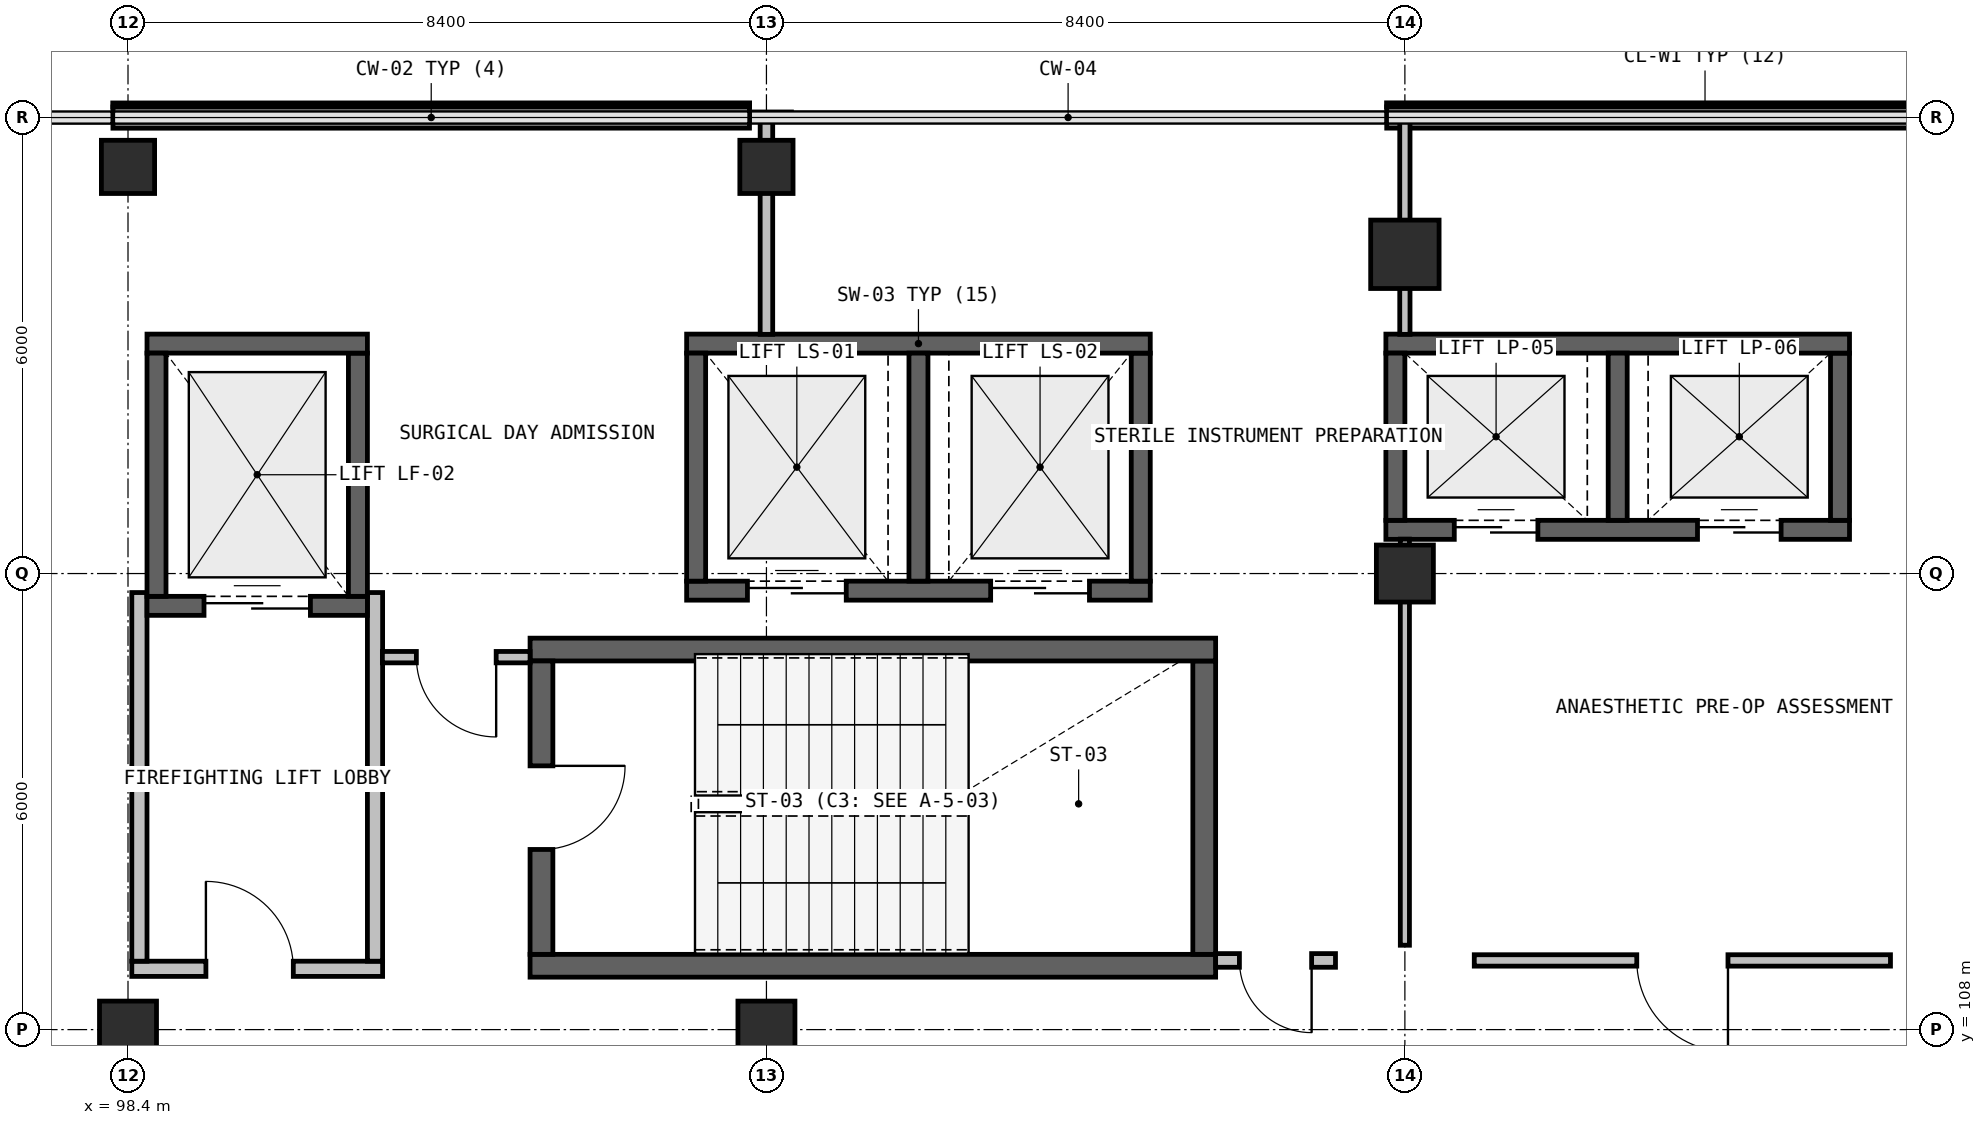
"""IFC4 building model, lengths in metres.
Left out: names, types, materials, properties, quantities, classifications, styles, units other than length and angle.
Written with IfcOpenShell. Run it as: python <this file> out.ifc"""

import sys

from ifc_helpers import new_model, si_unit, direction, frame, frame_2d, origin, origin_2d, place, context, subcontext, project, spatial, rectangle, extrude, element, fill, save


model = new_model("IFC4")
c1 = context("Model", 3, precision=1e-05, world=origin(), true_north=direction((0.0, 1.0)))
c2 = subcontext(c1, "Body", "Model", "MODEL_VIEW")
j1 = project(units=[si_unit("LENGTHUNIT", "METRE"), si_unit("PLANEANGLEUNIT", "RADIAN")], contexts=[c1])
p1 = place(None, origin())
s1 = spatial("IfcSite", under=j1, at=p1, CompositionType="ELEMENT")
p2 = place(p1, origin())
s2 = spatial("IfcBuilding", under=s1, at=p2, CompositionType="ELEMENT")
p3 = place(p2, frame((0.0, 0.0, 10.2)))
s3 = spatial("IfcBuildingStorey", under=s2, at=p3, CompositionType="ELEMENT", Elevation=10.2)
p4 = place(p3, frame((115.2, 118.2, 0.0), z_axis=(0.0, 0.0, 1.0), x_axis=(1.0, 0.0, 0.0)))
e1 = element("IfcColumn", 1, at=p4, inside=s3, PredefinedType="COLUMN", context=c2, shape_type="SweptSolid", body=[
    extrude(rectangle(XDim=0.9, YDim=0.9, at=origin_2d()), origin(), (0.0, 0.0, 1.0), 4.8),
])
p5 = place(p3, frame((98.4, 108.0, 0.0), z_axis=(0.0, 0.0, 1.0), x_axis=(1.0, 0.0, 0.0)))
e2 = element("IfcColumn", 2, at=p5, inside=s3, PredefinedType="COLUMN", context=c2, shape_type="SweptSolid", body=[
    extrude(rectangle(XDim=0.75, YDim=0.75, at=origin_2d()), origin(), (0.0, 0.0, 1.0), 4.8),
])
p6 = place(p3, frame((98.4, 119.35, 0.0), z_axis=(0.0, 0.0, 1.0), x_axis=(1.0, 0.0, 0.0)))
e3 = element("IfcColumn", 3, at=p6, inside=s3, PredefinedType="COLUMN", context=c2, shape_type="SweptSolid", body=[
    extrude(rectangle(XDim=0.7, YDim=0.7, at=origin_2d()), origin(), (0.0, 0.0, 1.0), 4.8),
])
p7 = place(p3, frame((106.8, 108.0, 0.0), z_axis=(0.0, 0.0, 1.0), x_axis=(1.0, 0.0, 0.0)))
e4 = element("IfcColumn", 4, at=p7, inside=s3, PredefinedType="COLUMN", context=c2, shape_type="SweptSolid", body=[
    extrude(rectangle(XDim=0.75, YDim=0.75, at=origin_2d()), origin(), (0.0, 0.0, 1.0), 4.8),
])
p8 = place(p3, frame((106.8, 119.35, 0.0), z_axis=(0.0, 0.0, 1.0), x_axis=(1.0, 0.0, 0.0)))
e5 = element("IfcColumn", 5, at=p8, inside=s3, PredefinedType="COLUMN", context=c2, shape_type="SweptSolid", body=[
    extrude(rectangle(XDim=0.7, YDim=0.7, at=origin_2d()), origin(), (0.0, 0.0, 1.0), 4.8),
])
p9 = place(p3, frame((115.2, 114.0, 0.0), z_axis=(0.0, 0.0, 1.0), x_axis=(1.0, 0.0, 0.0)))
e6 = element("IfcColumn", 6, at=p9, inside=s3, PredefinedType="COLUMN", context=c2, shape_type="SweptSolid", body=[
    extrude(rectangle(XDim=0.75, YDim=0.75, at=origin_2d()), origin(), (0.0, 0.0, 1.0), 4.8),
])
p10 = place(p3, frame((98.202, 119.999, 0.0), z_axis=(0.0, 0.0, 1.0), x_axis=(0.999999993202, 0.000116604477, 0.0)))
e7 = element("IfcWall", 7, at=p10, inside=s3, PredefinedType="SOLIDWALL", context=c2, shape_type="SweptSolid", body=[
    extrude(rectangle(XDim=8.375, YDim=0.28, at=frame_2d((4.188, 0.0))), origin(), (0.0, 0.0, 1.0), 0.94),
])
p11 = place(p3, frame((114.961, 120.0, 0.0), z_axis=(0.0, 0.0, 1.0), x_axis=(1.0, 0.0, 0.0)))
e8 = element("IfcWall", 8, at=p11, inside=s3, PredefinedType="SOLIDWALL", context=c2, shape_type="SweptSolid", body=[
    extrude(rectangle(XDim=8.376, YDim=0.28, at=frame_2d((4.188, 0.0))), origin(), (0.0, 0.0, 1.0), 0.94),
])
p12 = place(p3, frame((98.45, 108.8, 0.0), z_axis=(0.0, 0.0, 1.0), x_axis=(1.0, 0.0, 0.0)))
e9 = element("IfcWall", 9, at=p12, inside=s3, PredefinedType="SOLIDWALL", context=c2, shape_type="SweptSolid", body=[
    extrude(rectangle(XDim=3.3, YDim=0.2, at=frame_2d((1.65, 0.0))), origin(), (0.0, 0.0, 1.0), 4.46),
])
p13 = place(p12, frame((0.975, 0.0, 0.0)))
e10 = element("IfcOpeningElement", 10, at=p13, cuts=e9, PredefinedType="OPENING", context=c2, shape_type="SweptSolid", body=[
    extrude(rectangle(XDim=1.15, YDim=2.15, at=frame_2d((0.575, 1.075))), frame((0.0, 0.11, 0.0), z_axis=(0.0, -1.0, 0.0), x_axis=(1.0, 0.0, 0.0)), (0.0, 0.0, 1.0), 0.22),
])
p14 = place(p3, frame((101.65, 108.9, 0.0), z_axis=(0.0, 0.0, 1.0), x_axis=(0.0, 1.0, 0.0)))
e11 = element("IfcWall", 11, at=p14, inside=s3, PredefinedType="SOLIDWALL", context=c2, shape_type="SweptSolid", body=[
    extrude(rectangle(XDim=4.85, YDim=0.2, at=frame_2d((2.425, 0.0))), origin(), (0.0, 0.0, 1.0), 4.46),
])
p15 = place(p3, frame((98.55, 113.75, 0.0), z_axis=(0.0, 0.0, 1.0), x_axis=(0.0, -1.0, 0.0)))
e12 = element("IfcWall", 12, at=p15, inside=s3, PredefinedType="SOLIDWALL", context=c2, shape_type="SweptSolid", body=[
    extrude(rectangle(XDim=4.85, YDim=0.2, at=frame_2d((2.425, 0.0))), origin(), (0.0, 0.0, 1.0), 3.81),
])
p16 = place(p3, frame((103.69, 108.84, 0.0), z_axis=(0.0, 0.0, 1.0), x_axis=(1.0, 0.0, 0.0)))
e13 = element("IfcWall", 13, at=p16, inside=s3, PredefinedType="SHEAR", context=c2, shape_type="SweptSolid", body=[
    extrude(rectangle(XDim=9.02, YDim=0.3, at=frame_2d((4.51, 0.0))), origin(), (0.0, 0.0, 1.0), 4.46),
])
p17 = place(p3, frame((112.56, 108.99, 0.0), z_axis=(0.0, 0.0, 1.0), x_axis=(0.0, 1.0, 0.0)))
e14 = element("IfcWall", 14, at=p17, inside=s3, PredefinedType="SHEAR", context=c2, shape_type="SweptSolid", body=[
    extrude(rectangle(XDim=3.86, YDim=0.3, at=frame_2d((1.93, 0.0))), origin(), (0.0, 0.0, 1.0), 4.46),
])
p18 = place(p3, frame((112.71, 113.0, 0.0), z_axis=(0.0, 0.0, 1.0), x_axis=(-1.0, 0.0, 0.0)))
e15 = element("IfcWall", 15, at=p18, inside=s3, PredefinedType="SHEAR", context=c2, shape_type="SweptSolid", body=[
    extrude(rectangle(XDim=9.02, YDim=0.3, at=frame_2d((4.51, 0.0))), origin(), (0.0, 0.0, 1.0), 4.46),
])
p19 = place(p3, frame((103.84, 112.85, 0.0), z_axis=(0.0, 0.0, 1.0), x_axis=(0.0, -1.0, 0.0)))
e16 = element("IfcWall", 16, at=p19, inside=s3, PredefinedType="SHEAR", context=c2, shape_type="SweptSolid", body=[
    extrude(rectangle(XDim=3.86, YDim=0.3, at=frame_2d((1.93, 0.0))), origin(), (0.0, 0.0, 1.0), 4.46),
])
p20 = place(p19, frame((1.38, 0.0, 0.0)))
e17 = element("IfcOpeningElement", 17, at=p20, cuts=e16, PredefinedType="OPENING", context=c2, shape_type="SweptSolid", body=[
    extrude(rectangle(XDim=1.1, YDim=2.15, at=frame_2d((0.55, 1.075))), frame((0.0, 0.16, 0.0), z_axis=(0.0, -1.0, 0.0), x_axis=(1.0, 0.0, 0.0)), (0.0, 0.0, 1.0), 0.32),
])
p21 = place(p3, frame((98.65, 113.575, 0.0), z_axis=(0.0, 0.0, 1.0), x_axis=(1.0, 0.0, 0.0)))
e18 = element("IfcWall", 18, at=p21, inside=s3, PredefinedType="SHEAR", context=c2, shape_type="SweptSolid", body=[
    extrude(rectangle(XDim=2.9, YDim=0.25, at=frame_2d((1.45, 0.0))), origin(), (0.0, 0.0, 1.0), 4.46),
])
p22 = place(p21, frame((0.75, 0.0, 0.0)))
e19 = element("IfcOpeningElement", 19, at=p22, cuts=e18, PredefinedType="OPENING", context=c2, shape_type="SweptSolid", body=[
    extrude(rectangle(XDim=1.4, YDim=2.15, at=frame_2d((0.7, 1.075))), frame((0.0, 0.135, 0.0), z_axis=(0.0, -1.0, 0.0), x_axis=(1.0, 0.0, 0.0)), (0.0, 0.0, 1.0), 0.27),
])
p23 = place(p3, frame((101.425, 113.7, 0.0), z_axis=(0.0, 0.0, 1.0), x_axis=(0.0, 1.0, 0.0)))
e20 = element("IfcWall", 20, at=p23, inside=s3, PredefinedType="SHEAR", context=c2, shape_type="SweptSolid", body=[
    extrude(rectangle(XDim=3.2, YDim=0.25, at=frame_2d((1.6, 0.0))), origin(), (0.0, 0.0, 1.0), 4.46),
])
p24 = place(p3, frame((101.55, 117.025, 0.0), z_axis=(0.0, 0.0, 1.0), x_axis=(-1.0, 0.0, 0.0)))
e21 = element("IfcWall", 21, at=p24, inside=s3, PredefinedType="SHEAR", context=c2, shape_type="SweptSolid", body=[
    extrude(rectangle(XDim=2.9, YDim=0.25, at=frame_2d((1.45, 0.0))), origin(), (0.0, 0.0, 1.0), 4.46),
])
p25 = place(p3, frame((98.775, 116.9, 0.0), z_axis=(0.0, 0.0, 1.0), x_axis=(0.0, -1.0, 0.0)))
e22 = element("IfcWall", 22, at=p25, inside=s3, PredefinedType="SHEAR", context=c2, shape_type="SweptSolid", body=[
    extrude(rectangle(XDim=3.2, YDim=0.25, at=frame_2d((1.6, 0.0))), origin(), (0.0, 0.0, 1.0), 4.46),
])
p26 = place(p3, frame((105.75, 113.775, 0.0), z_axis=(0.0, 0.0, 1.0), x_axis=(1.0, 0.0, 0.0)))
e23 = element("IfcWall", 23, at=p26, inside=s3, PredefinedType="SHEAR", context=c2, shape_type="SweptSolid", body=[
    extrude(rectangle(XDim=6.1, YDim=0.25, at=frame_2d((3.05, 0.0))), origin(), (0.0, 0.0, 1.0), 4.46),
])
p27 = place(p26, frame((0.8, 0.0, 0.0)))
e24 = element("IfcOpeningElement", 24, at=p27, cuts=e23, PredefinedType="OPENING", context=c2, shape_type="SweptSolid", body=[
    extrude(rectangle(XDim=1.3, YDim=2.15, at=frame_2d((0.65, 1.075))), frame((0.0, 0.135, 0.0), z_axis=(0.0, -1.0, 0.0), x_axis=(1.0, 0.0, 0.0)), (0.0, 0.0, 1.0), 0.27),
])
p28 = place(p26, frame((4.0, 0.0, 0.0)))
e25 = element("IfcOpeningElement", 25, at=p28, cuts=e23, PredefinedType="OPENING", context=c2, shape_type="SweptSolid", body=[
    extrude(rectangle(XDim=1.3, YDim=2.15, at=frame_2d((0.65, 1.075))), frame((0.0, 0.135, 0.0), z_axis=(0.0, -1.0, 0.0), x_axis=(1.0, 0.0, 0.0)), (0.0, 0.0, 1.0), 0.27),
])
p29 = place(p3, frame((111.725, 113.9, 0.0), z_axis=(0.0, 0.0, 1.0), x_axis=(0.0, 1.0, 0.0)))
e26 = element("IfcWall", 26, at=p29, inside=s3, PredefinedType="SHEAR", context=c2, shape_type="SweptSolid", body=[
    extrude(rectangle(XDim=3.0, YDim=0.25, at=frame_2d((1.5, 0.0))), origin(), (0.0, 0.0, 1.0), 4.46),
])
p30 = place(p3, frame((111.85, 117.025, 0.0), z_axis=(0.0, 0.0, 1.0), x_axis=(-1.0, 0.0, 0.0)))
e27 = element("IfcWall", 27, at=p30, inside=s3, PredefinedType="SHEAR", context=c2, shape_type="SweptSolid", body=[
    extrude(rectangle(XDim=6.1, YDim=0.25, at=frame_2d((3.05, 0.0))), origin(), (0.0, 0.0, 1.0), 4.46),
])
for number, where, z_axis, x_axis in (
    (28, (105.875, 116.9, 0.0), (0.0, 0.0, 1.0), (0.0, -1.0, 0.0)),
    (29, (108.8, 113.9, 0.0), (0.0, 0.0, 1.0), (0.0, 1.0, 0.0)),
):
    element("IfcWall", number, at=place(p3, frame(where, z_axis=z_axis, x_axis=x_axis)), inside=s3, PredefinedType="SHEAR", context=c2, shape_type="SweptSolid", body=[
        extrude(rectangle(XDim=3.0, YDim=0.25, at=frame_2d((1.5, 0.0))), origin(), (0.0, 0.0, 1.0), 4.46),
    ])
p31 = place(p3, frame((114.95, 114.575, 0.0), z_axis=(0.0, 0.0, 1.0), x_axis=(1.0, 0.0, 0.0)))
e30 = element("IfcWall", 30, at=p31, inside=s3, PredefinedType="SHEAR", context=c2, shape_type="SweptSolid", body=[
    extrude(rectangle(XDim=6.1, YDim=0.25, at=frame_2d((3.05, 0.0))), origin(), (0.0, 0.0, 1.0), 4.46),
])
p32 = place(p31, frame((0.9, 0.0, 0.0)))
e31 = element("IfcOpeningElement", 31, at=p32, cuts=e30, PredefinedType="OPENING", context=c2, shape_type="SweptSolid", body=[
    extrude(rectangle(XDim=1.1, YDim=2.15, at=frame_2d((0.55, 1.075))), frame((0.0, 0.135, 0.0), z_axis=(0.0, -1.0, 0.0), x_axis=(1.0, 0.0, 0.0)), (0.0, 0.0, 1.0), 0.27),
])
p33 = place(p31, frame((4.1, 0.0, 0.0)))
e32 = element("IfcOpeningElement", 32, at=p33, cuts=e30, PredefinedType="OPENING", context=c2, shape_type="SweptSolid", body=[
    extrude(rectangle(XDim=1.1, YDim=2.15, at=frame_2d((0.55, 1.075))), frame((0.0, 0.135, 0.0), z_axis=(0.0, -1.0, 0.0), x_axis=(1.0, 0.0, 0.0)), (0.0, 0.0, 1.0), 0.27),
])
p34 = place(p3, frame((120.925, 114.7, 0.0), z_axis=(0.0, 0.0, 1.0), x_axis=(0.0, 1.0, 0.0)))
e33 = element("IfcWall", 33, at=p34, inside=s3, PredefinedType="SHEAR", context=c2, shape_type="SweptSolid", body=[
    extrude(rectangle(XDim=2.2, YDim=0.25, at=frame_2d((1.1, 0.0))), origin(), (0.0, 0.0, 1.0), 4.46),
])
p35 = place(p3, frame((121.05, 117.025, 0.0), z_axis=(0.0, 0.0, 1.0), x_axis=(-1.0, 0.0, 0.0)))
e34 = element("IfcWall", 34, at=p35, inside=s3, PredefinedType="SHEAR", context=c2, shape_type="SweptSolid", body=[
    extrude(rectangle(XDim=6.1, YDim=0.25, at=frame_2d((3.05, 0.0))), origin(), (0.0, 0.0, 1.0), 4.46),
])
for number, where, z_axis, x_axis in (
    (35, (115.075, 116.9, 0.0), (0.0, 0.0, 1.0), (0.0, -1.0, 0.0)),
    (36, (118.0, 114.7, 0.0), (0.0, 0.0, 1.0), (0.0, 1.0, 0.0)),
):
    element("IfcWall", number, at=place(p3, frame(where, z_axis=z_axis, x_axis=x_axis)), inside=s3, PredefinedType="SHEAR", context=c2, shape_type="SweptSolid", body=[
        extrude(rectangle(XDim=2.2, YDim=0.25, at=frame_2d((1.1, 0.0))), origin(), (0.0, 0.0, 1.0), 4.46),
    ])
p36 = place(p3, frame((106.8, 119.989, 0.0), z_axis=(0.0, 0.0, 1.0), x_axis=(0.0, -1.0, 0.0)))
e37 = element("IfcWall", 37, at=p36, inside=s3, PredefinedType="PARTITIONING", context=c2, shape_type="SweptSolid", body=[
    extrude(rectangle(XDim=2.842, YDim=0.165, at=frame_2d((1.421, 0.0))), origin(), (0.0, 0.0, 1.0), 4.46),
])
p37 = place(p3, frame((103.69, 112.9, 0.0), z_axis=(0.0, 0.0, 1.0), x_axis=(-1.0, 0.0, 0.0)))
e38 = element("IfcWall", 38, at=p37, inside=s3, PredefinedType="PARTITIONING", context=c2, shape_type="SweptSolid", body=[
    extrude(rectangle(XDim=1.943, YDim=0.15, at=frame_2d((0.971, 0.0))), origin(), (0.0, 0.0, 1.0), 4.46),
])
p38 = place(p37, frame((0.446, 0.0, 0.0)))
e39 = element("IfcOpeningElement", 39, at=p38, cuts=e38, PredefinedType="OPENING", context=c2, shape_type="SweptSolid", body=[
    extrude(rectangle(XDim=1.05, YDim=2.15, at=frame_2d((0.525, 1.075))), frame((0.0, 0.085, 0.0), z_axis=(0.0, -1.0, 0.0), x_axis=(1.0, 0.0, 0.0)), (0.0, 0.0, 1.0), 0.17),
])
p39 = place(p3, frame((115.2, 119.958, 0.0), z_axis=(0.0, 0.0, 1.0), x_axis=(0.0, -1.0, 0.0)))
e40 = element("IfcWall", 40, at=p39, inside=s3, PredefinedType="PARTITIONING", context=c2, shape_type="SweptSolid", body=[
    extrude(rectangle(XDim=2.811, YDim=0.135, at=frame_2d((1.406, 0.0))), origin(), (0.0, 0.0, 1.0), 4.46),
])
p40 = place(p3, frame((115.2, 114.453, 0.0), z_axis=(0.0, 0.0, 1.0), x_axis=(0.0, -1.0, 0.0)))
e41 = element("IfcWall", 41, at=p40, inside=s3, PredefinedType="PARTITIONING", context=c2, shape_type="SweptSolid", body=[
    extrude(rectangle(XDim=5.343, YDim=0.12, at=frame_2d((2.671, 0.0))), origin(), (0.0, 0.0, 1.0), 3.81),
])
p41 = place(p3, frame((114.287, 108.91, 0.0), z_axis=(0.0, 0.0, 1.0), x_axis=(-1.0, 0.0, 0.0)))
e42 = element("IfcWall", 42, at=p41, inside=s3, PredefinedType="PARTITIONING", context=c2, shape_type="SweptSolid", body=[
    extrude(rectangle(XDim=1.577, YDim=0.18, at=frame_2d((0.789, 0.0))), origin(), (0.0, 0.0, 1.0), 4.46),
])
p42 = place(p41, frame((0.314, 0.0, 0.0)))
e43 = element("IfcOpeningElement", 43, at=p42, cuts=e42, PredefinedType="OPENING", context=c2, shape_type="SweptSolid", body=[
    extrude(rectangle(XDim=0.95, YDim=2.1, at=frame_2d((0.475, 1.05))), frame((0.0, 0.1, 0.0), z_axis=(0.0, -1.0, 0.0), x_axis=(1.0, 0.0, 0.0)), (0.0, 0.0, 1.0), 0.2),
])
p43 = place(p3, frame((121.589, 108.91, 0.0), z_axis=(0.0, 0.0, 1.0), x_axis=(-1.0, 0.0, 0.0)))
e44 = element("IfcWall", 44, at=p43, inside=s3, PredefinedType="PARTITIONING", context=c2, shape_type="SweptSolid", body=[
    extrude(rectangle(XDim=5.476, YDim=0.15, at=frame_2d((2.738, 0.0))), origin(), (0.0, 0.0, 1.0), 4.46),
])
p44 = place(p43, frame((2.138, 0.0, 0.0)))
e45 = element("IfcOpeningElement", 45, at=p44, cuts=e44, PredefinedType="OPENING", context=c2, shape_type="SweptSolid", body=[
    extrude(rectangle(XDim=1.2, YDim=2.15, at=frame_2d((0.6, 1.075))), frame((0.0, 0.085, 0.0), z_axis=(0.0, -1.0, 0.0), x_axis=(1.0, 0.0, 0.0)), (0.0, 0.0, 1.0), 0.17),
])
p45 = place(p13, origin())
e46 = element("IfcDoor", 46, at=p45, inside=s3, OperationType="SINGLE_SWING_RIGHT", PredefinedType="DOOR", context=c2, shape_type="SweptSolid", body=[
    extrude(rectangle(XDim=1.15, YDim=2.15, at=frame_2d((0.575, 1.075))), frame((0.0, 0.025, 0.0), z_axis=(0.0, -1.0, 0.0), x_axis=(1.0, 0.0, 0.0)), (0.0, 0.0, 1.0), 0.05),
])
fill(e10, e46)
p46 = place(p20, origin())
e47 = element("IfcDoor", 47, at=p46, inside=s3, OperationType="SINGLE_SWING_RIGHT", PredefinedType="DOOR", context=c2, shape_type="SweptSolid", body=[
    extrude(rectangle(XDim=1.1, YDim=2.15, at=frame_2d((0.55, 1.075))), frame((0.0, 0.025, 0.0), z_axis=(0.0, -1.0, 0.0), x_axis=(1.0, 0.0, 0.0)), (0.0, 0.0, 1.0), 0.05),
])
fill(e17, e47)
p47 = place(p22, origin())
e48 = element("IfcDoor", 48, at=p47, inside=s3, OperationType="DOUBLE_DOOR_SLIDING", PredefinedType="DOOR", context=c2, shape_type="SweptSolid", body=[
    extrude(rectangle(XDim=1.4, YDim=2.15, at=frame_2d((0.7, 1.075))), frame((0.0, 0.025, 0.0), z_axis=(0.0, -1.0, 0.0), x_axis=(1.0, 0.0, 0.0)), (0.0, 0.0, 1.0), 0.05),
])
fill(e19, e48)
p48 = place(p27, origin())
e49 = element("IfcDoor", 49, at=p48, inside=s3, OperationType="DOUBLE_DOOR_SLIDING", PredefinedType="DOOR", context=c2, shape_type="SweptSolid", body=[
    extrude(rectangle(XDim=1.3, YDim=2.15, at=frame_2d((0.65, 1.075))), frame((0.0, 0.025, 0.0), z_axis=(0.0, -1.0, 0.0), x_axis=(1.0, 0.0, 0.0)), (0.0, 0.0, 1.0), 0.05),
])
fill(e24, e49)
p49 = place(p28, origin())
e50 = element("IfcDoor", 50, at=p49, inside=s3, OperationType="DOUBLE_DOOR_SLIDING", PredefinedType="DOOR", context=c2, shape_type="SweptSolid", body=[
    extrude(rectangle(XDim=1.3, YDim=2.15, at=frame_2d((0.65, 1.075))), frame((0.0, 0.025, 0.0), z_axis=(0.0, -1.0, 0.0), x_axis=(1.0, 0.0, 0.0)), (0.0, 0.0, 1.0), 0.05),
])
fill(e25, e50)
p50 = place(p32, origin())
e51 = element("IfcDoor", 51, at=p50, inside=s3, OperationType="DOUBLE_DOOR_SLIDING", PredefinedType="DOOR", context=c2, shape_type="SweptSolid", body=[
    extrude(rectangle(XDim=1.1, YDim=2.15, at=frame_2d((0.55, 1.075))), frame((0.0, 0.025, 0.0), z_axis=(0.0, -1.0, 0.0), x_axis=(1.0, 0.0, 0.0)), (0.0, 0.0, 1.0), 0.05),
])
fill(e31, e51)
p51 = place(p33, origin())
e52 = element("IfcDoor", 52, at=p51, inside=s3, OperationType="DOUBLE_DOOR_SLIDING", PredefinedType="DOOR", context=c2, shape_type="SweptSolid", body=[
    extrude(rectangle(XDim=1.1, YDim=2.15, at=frame_2d((0.55, 1.075))), frame((0.0, 0.025, 0.0), z_axis=(0.0, -1.0, 0.0), x_axis=(1.0, 0.0, 0.0)), (0.0, 0.0, 1.0), 0.05),
])
fill(e32, e52)
p52 = place(p38, origin())
e53 = element("IfcDoor", 53, at=p52, inside=s3, OperationType="SINGLE_SWING_RIGHT", PredefinedType="DOOR", context=c2, shape_type="SweptSolid", body=[
    extrude(rectangle(XDim=1.05, YDim=2.15, at=frame_2d((0.525, 1.075))), frame((0.0, 0.025, 0.0), z_axis=(0.0, -1.0, 0.0), x_axis=(1.0, 0.0, 0.0)), (0.0, 0.0, 1.0), 0.05),
])
fill(e39, e53)
p53 = place(p42, origin())
e54 = element("IfcDoor", 54, at=p53, inside=s3, OperationType="SINGLE_SWING_LEFT", PredefinedType="DOOR", context=c2, shape_type="SweptSolid", body=[
    extrude(rectangle(XDim=0.95, YDim=2.1, at=frame_2d((0.475, 1.05))), frame((0.0, 0.025, 0.0), z_axis=(0.0, -1.0, 0.0), x_axis=(1.0, 0.0, 0.0)), (0.0, 0.0, 1.0), 0.05),
])
fill(e43, e54)
p54 = place(p44, origin())
e55 = element("IfcDoor", 55, at=p54, inside=s3, OperationType="SINGLE_SWING_RIGHT", PredefinedType="DOOR", context=c2, shape_type="SweptSolid", body=[
    extrude(rectangle(XDim=1.2, YDim=2.15, at=frame_2d((0.6, 1.075))), frame((0.0, 0.025, 0.0), z_axis=(0.0, -1.0, 0.0), x_axis=(1.0, 0.0, 0.0)), (0.0, 0.0, 1.0), 0.05),
])
fill(e45, e55)
save(model, sys.argv[1])
